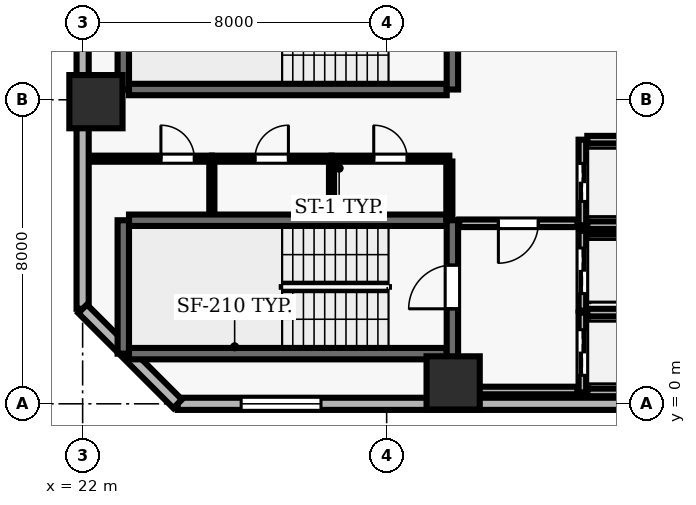
"""IFC4 building model, lengths in metres.
Left out: names, types, materials, properties, quantities, classifications, styles, units other than length and angle.
Written with IfcOpenShell. Run it as: python <this file> out.ifc"""

import sys

from ifc_helpers import new_model, si_unit, direction, frame, frame_2d, origin, origin_2d, place, context, subcontext, project, spatial, rectangle, extrude, element, fill, save


model = new_model("IFC4")
c1 = context("Model", 3, precision=1e-05, world=origin(), true_north=direction((0.0, 1.0)))
c2 = subcontext(c1, "Body", "Model", "MODEL_VIEW")
j1 = project(units=[si_unit("LENGTHUNIT", "METRE"), si_unit("PLANEANGLEUNIT", "RADIAN")], contexts=[c1])
p1 = place(None, origin())
s1 = spatial("IfcSite", under=j1, at=p1, CompositionType="ELEMENT")
p2 = place(p1, origin())
s2 = spatial("IfcBuilding", under=s1, at=p2, CompositionType="ELEMENT")
p3 = place(p2, frame((0.0, 0.0, 66.1)))
s3 = spatial("IfcBuildingStorey", under=s2, at=p3, CompositionType="ELEMENT", Elevation=66.1)
for number, where, z_axis, x_axis in (
    (1, (31.75, 0.55, 0.0), (0.0, 0.0, 1.0), (1.0, 0.0, 0.0)),
    (2, (22.35, 7.95, 0.0), (0.0, 0.0, 1.0), (1.0, 0.0, 0.0)),
):
    element("IfcColumn", number, at=place(p3, frame(where, z_axis=z_axis, x_axis=x_axis)), inside=s3, PredefinedType="COLUMN", context=c2, shape_type="SweptSolid", body=[
        extrude(rectangle(XDim=1.4, YDim=1.4, at=origin_2d()), origin(), (0.0, 0.0, 1.0), 3.9),
    ])
p4 = place(p3, frame((24.5, 0.0, 0.0), z_axis=(0.0, 0.0, 1.0), x_axis=(1.0, 0.0, 0.0)))
e3 = element("IfcWall", 3, at=p4, inside=s3, PredefinedType="SOLIDWALL", context=c2, shape_type="SweptSolid", body=[
    extrude(rectangle(XDim=49.0, YDim=0.32, at=frame_2d((24.5, 0.0))), origin(), (0.0, 0.0, 1.0), 3.69),
])
p5 = place(p4, frame((1.672, 0.0, 0.9)))
e4 = element("IfcOpeningElement", 4, at=p5, cuts=e3, PredefinedType="OPENING", context=c2, shape_type="SweptSolid", body=[
    extrude(rectangle(XDim=2.1, YDim=1.6, at=frame_2d((1.05, 0.8))), frame((0.0, 0.17, 0.0), z_axis=(0.0, -1.0, 0.0), x_axis=(1.0, 0.0, 0.0)), (0.0, 0.0, 1.0), 0.34),
])
p6 = place(p4, frame((18.006, 0.0, 0.9)))
e5 = element("IfcOpeningElement", 5, at=p6, cuts=e3, PredefinedType="OPENING", context=c2, shape_type="SweptSolid", body=[
    extrude(rectangle(XDim=2.1, YDim=1.6, at=frame_2d((1.05, 0.8))), frame((0.0, 0.17, 0.0), z_axis=(0.0, -1.0, 0.0), x_axis=(1.0, 0.0, 0.0)), (0.0, 0.0, 1.0), 0.34),
])
p7 = place(p4, frame((23.9, 0.0, 0.9)))
e6 = element("IfcOpeningElement", 6, at=p7, cuts=e3, PredefinedType="OPENING", context=c2, shape_type="SweptSolid", body=[
    extrude(rectangle(XDim=2.1, YDim=1.6, at=frame_2d((1.05, 0.8))), frame((0.0, 0.17, 0.0), z_axis=(0.0, -1.0, 0.0), x_axis=(1.0, 0.0, 0.0)), (0.0, 0.0, 1.0), 0.34),
])
p8 = place(p4, frame((34.339, 0.0, 0.9)))
e7 = element("IfcOpeningElement", 7, at=p8, cuts=e3, PredefinedType="OPENING", context=c2, shape_type="SweptSolid", body=[
    extrude(rectangle(XDim=2.1, YDim=1.6, at=frame_2d((1.05, 0.8))), frame((0.0, 0.17, 0.0), z_axis=(0.0, -1.0, 0.0), x_axis=(1.0, 0.0, 0.0)), (0.0, 0.0, 1.0), 0.34),
])
p9 = place(p4, frame((39.783, 0.0, 0.9)))
e8 = element("IfcOpeningElement", 8, at=p9, cuts=e3, PredefinedType="OPENING", context=c2, shape_type="SweptSolid", body=[
    extrude(rectangle(XDim=2.1, YDim=1.6, at=frame_2d((1.05, 0.8))), frame((0.0, 0.17, 0.0), z_axis=(0.0, -1.0, 0.0), x_axis=(1.0, 0.0, 0.0)), (0.0, 0.0, 1.0), 0.34),
])
p10 = place(p4, frame((45.678, 0.0, 0.9)))
e9 = element("IfcOpeningElement", 9, at=p10, cuts=e3, PredefinedType="OPENING", context=c2, shape_type="SweptSolid", body=[
    extrude(rectangle(XDim=2.1, YDim=1.6, at=frame_2d((1.05, 0.8))), frame((0.0, 0.17, 0.0), z_axis=(0.0, -1.0, 0.0), x_axis=(1.0, 0.0, 0.0)), (0.0, 0.0, 1.0), 0.34),
])
p11 = place(p3, frame((22.0, 51.5, 0.0), z_axis=(0.0, 0.0, 1.0), x_axis=(0.0, -1.0, 0.0)))
e10 = element("IfcWall", 10, at=p11, inside=s3, PredefinedType="SOLIDWALL", context=c2, shape_type="SweptSolid", body=[
    extrude(rectangle(XDim=49.0, YDim=0.32, at=frame_2d((24.5, 0.0))), origin(), (0.0, 0.0, 1.0), 3.69),
])
p12 = place(p11, frame((12.1, 0.0, 0.0)))
e11 = element("IfcOpeningElement", 11, at=p12, cuts=e10, PredefinedType="OPENING", context=c2, shape_type="SweptSolid", body=[
    extrude(rectangle(XDim=1.0, YDim=2.2, at=frame_2d((0.5, 1.1))), frame((0.0, 0.17, 0.0), z_axis=(0.0, -1.0, 0.0), x_axis=(1.0, 0.0, 0.0)), (0.0, 0.0, 1.0), 0.34),
])
p13 = place(p11, frame((1.672, 0.0, 0.9)))
e12 = element("IfcOpeningElement", 12, at=p13, cuts=e10, PredefinedType="OPENING", context=c2, shape_type="SweptSolid", body=[
    extrude(rectangle(XDim=2.1, YDim=1.6, at=frame_2d((1.05, 0.8))), frame((0.0, 0.17, 0.0), z_axis=(0.0, -1.0, 0.0), x_axis=(1.0, 0.0, 0.0)), (0.0, 0.0, 1.0), 0.34),
])
p14 = place(p11, frame((7.117, 0.0, 0.9)))
e13 = element("IfcOpeningElement", 13, at=p14, cuts=e10, PredefinedType="OPENING", context=c2, shape_type="SweptSolid", body=[
    extrude(rectangle(XDim=2.1, YDim=1.6, at=frame_2d((1.05, 0.8))), frame((0.0, 0.17, 0.0), z_axis=(0.0, -1.0, 0.0), x_axis=(1.0, 0.0, 0.0)), (0.0, 0.0, 1.0), 0.34),
])
p15 = place(p11, frame((18.006, 0.0, 0.9)))
e14 = element("IfcOpeningElement", 14, at=p15, cuts=e10, PredefinedType="OPENING", context=c2, shape_type="SweptSolid", body=[
    extrude(rectangle(XDim=2.1, YDim=1.6, at=frame_2d((1.05, 0.8))), frame((0.0, 0.17, 0.0), z_axis=(0.0, -1.0, 0.0), x_axis=(1.0, 0.0, 0.0)), (0.0, 0.0, 1.0), 0.34),
])
p16 = place(p11, frame((22.55, 0.0, 0.9)))
e15 = element("IfcOpeningElement", 15, at=p16, cuts=e10, PredefinedType="OPENING", context=c2, shape_type="SweptSolid", body=[
    extrude(rectangle(XDim=2.1, YDim=1.6, at=frame_2d((1.05, 0.8))), frame((0.0, 0.17, 0.0), z_axis=(0.0, -1.0, 0.0), x_axis=(1.0, 0.0, 0.0)), (0.0, 0.0, 1.0), 0.34),
])
p17 = place(p11, frame((29.344, 0.0, 0.9)))
e16 = element("IfcOpeningElement", 16, at=p17, cuts=e10, PredefinedType="OPENING", context=c2, shape_type="SweptSolid", body=[
    extrude(rectangle(XDim=2.1, YDim=1.6, at=frame_2d((1.05, 0.8))), frame((0.0, 0.17, 0.0), z_axis=(0.0, -1.0, 0.0), x_axis=(1.0, 0.0, 0.0)), (0.0, 0.0, 1.0), 0.34),
])
p18 = place(p11, frame((33.889, 0.0, 0.9)))
e17 = element("IfcOpeningElement", 17, at=p18, cuts=e10, PredefinedType="OPENING", context=c2, shape_type="SweptSolid", body=[
    extrude(rectangle(XDim=2.1, YDim=1.6, at=frame_2d((1.05, 0.8))), frame((0.0, 0.17, 0.0), z_axis=(0.0, -1.0, 0.0), x_axis=(1.0, 0.0, 0.0)), (0.0, 0.0, 1.0), 0.34),
])
p19 = place(p11, frame((39.783, 0.0, 0.9)))
e18 = element("IfcOpeningElement", 18, at=p19, cuts=e10, PredefinedType="OPENING", context=c2, shape_type="SweptSolid", body=[
    extrude(rectangle(XDim=2.1, YDim=1.6, at=frame_2d((1.05, 0.8))), frame((0.0, 0.17, 0.0), z_axis=(0.0, -1.0, 0.0), x_axis=(1.0, 0.0, 0.0)), (0.0, 0.0, 1.0), 0.34),
])
p20 = place(p3, frame((22.0, 2.5, 0.0), z_axis=(0.0, 0.0, 1.0), x_axis=(0.707106781187, -0.707106781187, 0.0)))
e19 = element("IfcWall", 19, at=p20, inside=s3, PredefinedType="SOLIDWALL", context=c2, shape_type="SweptSolid", body=[
    extrude(rectangle(XDim=3.536, YDim=0.32, at=frame_2d((1.768, 0.0))), origin(), (0.0, 0.0, 1.0), 3.69),
])
p21 = place(p3, frame((31.58, 4.83, 0.0), z_axis=(0.0, 0.0, 1.0), x_axis=(-1.0, 0.0, 0.0)))
e20 = element("IfcWall", 20, at=p21, inside=s3, PredefinedType="SHEAR", context=c2, shape_type="SweptSolid", body=[
    extrude(rectangle(XDim=8.36, YDim=0.3, at=frame_2d((4.18, 0.0))), origin(), (0.0, 0.0, 1.0), 3.69),
])
p22 = place(p3, frame((23.07, 4.83, 0.0), z_axis=(0.0, 0.0, 1.0), x_axis=(0.0, -1.0, 0.0)))
e21 = element("IfcWall", 21, at=p22, inside=s3, PredefinedType="SHEAR", context=c2, shape_type="SweptSolid", body=[
    extrude(rectangle(XDim=3.51, YDim=0.3, at=frame_2d((1.755, 0.0))), origin(), (0.0, 0.0, 1.0), 3.69),
])
p23 = place(p3, frame((23.22, 1.32, 0.0), z_axis=(0.0, 0.0, 1.0), x_axis=(1.0, 0.0, 0.0)))
e22 = element("IfcWall", 22, at=p23, inside=s3, PredefinedType="SHEAR", context=c2, shape_type="SweptSolid", body=[
    extrude(rectangle(XDim=8.36, YDim=0.3, at=frame_2d((4.18, 0.0))), origin(), (0.0, 0.0, 1.0), 3.69),
])
p24 = place(p3, frame((31.73, 0.96, 0.0), z_axis=(0.0, 0.0, 1.0), x_axis=(0.0, 1.0, 0.0)))
e23 = element("IfcWall", 23, at=p24, inside=s3, PredefinedType="SHEAR", context=c2, shape_type="SweptSolid", body=[
    extrude(rectangle(XDim=3.87, YDim=0.3, at=frame_2d((1.935, 0.0))), origin(), (0.0, 0.0, 1.0), 3.69),
])
p25 = place(p24, frame((1.54, 0.0, 0.0)))
e24 = element("IfcOpeningElement", 24, at=p25, cuts=e23, PredefinedType="OPENING", context=c2, shape_type="SweptSolid", body=[
    extrude(rectangle(XDim=1.15, YDim=2.15, at=frame_2d((0.575, 1.075))), frame((0.0, 0.16, 0.0), z_axis=(0.0, -1.0, 0.0), x_axis=(1.0, 0.0, 0.0)), (0.0, 0.0, 1.0), 0.32),
])
p26 = place(p3, frame((23.07, 11.78, 0.0), z_axis=(0.0, 0.0, 1.0), x_axis=(0.0, -1.0, 0.0)))
e25 = element("IfcWall", 25, at=p26, inside=s3, PredefinedType="SHEAR", context=c2, shape_type="SweptSolid", body=[
    extrude(rectangle(XDim=3.51, YDim=0.3, at=frame_2d((1.755, 0.0))), origin(), (0.0, 0.0, 1.0), 3.69),
])
p27 = place(p3, frame((23.22, 8.27, 0.0), z_axis=(0.0, 0.0, 1.0), x_axis=(1.0, 0.0, 0.0)))
e26 = element("IfcWall", 26, at=p27, inside=s3, PredefinedType="SHEAR", context=c2, shape_type="SweptSolid", body=[
    extrude(rectangle(XDim=8.36, YDim=0.3, at=frame_2d((4.18, 0.0))), origin(), (0.0, 0.0, 1.0), 3.69),
])
p28 = place(p3, frame((31.73, 8.27, 0.0), z_axis=(0.0, 0.0, 1.0), x_axis=(0.0, 1.0, 0.0)))
e27 = element("IfcWall", 27, at=p28, inside=s3, PredefinedType="SHEAR", context=c2, shape_type="SweptSolid", body=[
    extrude(rectangle(XDim=3.51, YDim=0.3, at=frame_2d((1.755, 0.0))), origin(), (0.0, 0.0, 1.0), 3.69),
])
p29 = place(p28, frame((1.18, 0.0, 0.0)))
e28 = element("IfcOpeningElement", 28, at=p29, cuts=e27, PredefinedType="OPENING", context=c2, shape_type="SweptSolid", body=[
    extrude(rectangle(XDim=1.15, YDim=2.15, at=frame_2d((0.575, 1.075))), frame((0.0, 0.16, 0.0), z_axis=(0.0, -1.0, 0.0), x_axis=(1.0, 0.0, 0.0)), (0.0, 0.0, 1.0), 0.32),
])
p30 = place(p3, frame((35.15, 2.4, 0.0), z_axis=(0.0, 0.0, 1.0), x_axis=(0.0, -1.0, 0.0)))
e29 = element("IfcWall", 29, at=p30, inside=s3, PredefinedType="SOLIDWALL", context=c2, shape_type="SweptSolid", body=[
    extrude(rectangle(XDim=2.1, YDim=0.2, at=frame_2d((1.05, 0.0))), origin(), (0.0, 0.0, 1.0), 3.69),
])
p31 = place(p30, frame((0.45, 0.0, 0.0)))
e30 = element("IfcOpeningElement", 30, at=p31, cuts=e29, PredefinedType="OPENING", context=c2, shape_type="SweptSolid", body=[
    extrude(rectangle(XDim=1.2, YDim=2.15, at=frame_2d((0.6, 1.075))), frame((0.0, 0.11, 0.0), z_axis=(0.0, -1.0, 0.0), x_axis=(1.0, 0.0, 0.0)), (0.0, 0.0, 1.0), 0.22),
])
for number, where, z_axis, x_axis in (
    (31, (35.28, 0.3, 0.0), (0.0, 0.0, 1.0), (1.0, 0.0, 0.0)),
    (32, (37.42, 2.4, 0.0), (0.0, 0.0, 1.0), (-1.0, 0.0, 0.0)),
):
    element("IfcWall", number, at=place(p3, frame(where, z_axis=z_axis, x_axis=x_axis)), inside=s3, PredefinedType="SOLIDWALL", context=c2, shape_type="SweptSolid", body=[
        extrude(rectangle(XDim=2.14, YDim=0.2, at=frame_2d((1.07, 0.0))), origin(), (0.0, 0.0, 1.0), 3.69),
    ])
p32 = place(p3, frame((35.15, 4.55, 0.0), z_axis=(0.0, 0.0, 1.0), x_axis=(0.0, -1.0, 0.0)))
e33 = element("IfcWall", 33, at=p32, inside=s3, PredefinedType="SOLIDWALL", context=c2, shape_type="SweptSolid", body=[
    extrude(rectangle(XDim=2.1, YDim=0.2, at=frame_2d((1.05, 0.0))), origin(), (0.0, 0.0, 1.0), 3.69),
])
p33 = place(p32, frame((0.45, 0.0, 0.0)))
e34 = element("IfcOpeningElement", 34, at=p33, cuts=e33, PredefinedType="OPENING", context=c2, shape_type="SweptSolid", body=[
    extrude(rectangle(XDim=1.2, YDim=2.15, at=frame_2d((0.6, 1.075))), frame((0.0, 0.11, 0.0), z_axis=(0.0, -1.0, 0.0), x_axis=(1.0, 0.0, 0.0)), (0.0, 0.0, 1.0), 0.22),
])
p34 = place(p3, frame((37.42, 4.55, 0.0), z_axis=(0.0, 0.0, 1.0), x_axis=(-1.0, 0.0, 0.0)))
e35 = element("IfcWall", 35, at=p34, inside=s3, PredefinedType="SOLIDWALL", context=c2, shape_type="SweptSolid", body=[
    extrude(rectangle(XDim=2.14, YDim=0.2, at=frame_2d((1.07, 0.0))), origin(), (0.0, 0.0, 1.0), 3.69),
])
p35 = place(p3, frame((35.15, 6.95, 0.0), z_axis=(0.0, 0.0, 1.0), x_axis=(0.0, -1.0, 0.0)))
e36 = element("IfcWall", 36, at=p35, inside=s3, PredefinedType="SOLIDWALL", context=c2, shape_type="SweptSolid", body=[
    extrude(rectangle(XDim=2.25, YDim=0.2, at=frame_2d((1.125, 0.0))), origin(), (0.0, 0.0, 1.0), 3.69),
])
p36 = place(p35, frame((0.625, 0.0, 0.0)))
e37 = element("IfcOpeningElement", 37, at=p36, cuts=e36, PredefinedType="OPENING", context=c2, shape_type="SweptSolid", body=[
    extrude(rectangle(XDim=1.0, YDim=2.1, at=frame_2d((0.5, 1.05))), frame((0.0, 0.11, 0.0), z_axis=(0.0, -1.0, 0.0), x_axis=(1.0, 0.0, 0.0)), (0.0, 0.0, 1.0), 0.22),
])
for number, where, z_axis, x_axis in (
    (38, (35.28, 4.7, 0.0), (0.0, 0.0, 1.0), (1.0, 0.0, 0.0)),
    (39, (37.42, 6.95, 0.0), (0.0, 0.0, 1.0), (-1.0, 0.0, 0.0)),
):
    element("IfcWall", number, at=place(p3, frame(where, z_axis=z_axis, x_axis=x_axis)), inside=s3, PredefinedType="SOLIDWALL", context=c2, shape_type="SweptSolid", body=[
        extrude(rectangle(XDim=2.14, YDim=0.2, at=frame_2d((1.07, 0.0))), origin(), (0.0, 0.0, 1.0), 3.69),
    ])
p37 = place(p3, frame((22.2, 6.45, 0.0), z_axis=(0.0, 0.0, 1.0), x_axis=(1.0, 0.0, 0.0)))
e40 = element("IfcWall", 40, at=p37, inside=s3, PredefinedType="PARTITIONING", context=c2, shape_type="SweptSolid", body=[
    extrude(rectangle(XDim=3.2, YDim=0.16, at=frame_2d((1.6, 0.0))), origin(), (0.0, 0.0, 1.0), 3.69),
])
p38 = place(p37, frame((1.86, 0.0, 0.0)))
e41 = element("IfcOpeningElement", 41, at=p38, cuts=e40, PredefinedType="OPENING", context=c2, shape_type="SweptSolid", body=[
    extrude(rectangle(XDim=0.88, YDim=2.1, at=frame_2d((0.44, 1.05))), frame((0.0, 0.09, 0.0), z_axis=(0.0, -1.0, 0.0), x_axis=(1.0, 0.0, 0.0)), (0.0, 0.0, 1.0), 0.18),
])
p39 = place(p3, frame((25.4, 6.45, 0.0), z_axis=(0.0, 0.0, 1.0), x_axis=(1.0, 0.0, 0.0)))
e42 = element("IfcWall", 42, at=p39, inside=s3, PredefinedType="PARTITIONING", context=c2, shape_type="SweptSolid", body=[
    extrude(rectangle(XDim=3.15, YDim=0.16, at=frame_2d((1.575, 0.0))), origin(), (0.0, 0.0, 1.0), 3.69),
])
p40 = place(p39, frame((1.135, 0.0, 0.0)))
e43 = element("IfcOpeningElement", 43, at=p40, cuts=e42, PredefinedType="OPENING", context=c2, shape_type="SweptSolid", body=[
    extrude(rectangle(XDim=0.88, YDim=2.1, at=frame_2d((0.44, 1.05))), frame((0.0, 0.09, 0.0), z_axis=(0.0, -1.0, 0.0), x_axis=(1.0, 0.0, 0.0)), (0.0, 0.0, 1.0), 0.18),
])
p41 = place(p3, frame((28.55, 6.45, 0.0), z_axis=(0.0, 0.0, 1.0), x_axis=(1.0, 0.0, 0.0)))
e44 = element("IfcWall", 44, at=p41, inside=s3, PredefinedType="PARTITIONING", context=c2, shape_type="SweptSolid", body=[
    extrude(rectangle(XDim=3.1, YDim=0.16, at=frame_2d((1.55, 0.0))), origin(), (0.0, 0.0, 1.0), 3.69),
])
p42 = place(p41, frame((1.11, 0.0, 0.0)))
e45 = element("IfcOpeningElement", 45, at=p42, cuts=e44, PredefinedType="OPENING", context=c2, shape_type="SweptSolid", body=[
    extrude(rectangle(XDim=0.88, YDim=2.1, at=frame_2d((0.44, 1.05))), frame((0.0, 0.09, 0.0), z_axis=(0.0, -1.0, 0.0), x_axis=(1.0, 0.0, 0.0)), (0.0, 0.0, 1.0), 0.18),
])
p43 = place(p3, frame((31.65, 0.35, 0.0), z_axis=(0.0, 0.0, 1.0), x_axis=(1.0, 0.0, 0.0)))
e46 = element("IfcWall", 46, at=p43, inside=s3, PredefinedType="SOLIDWALL", context=c2, shape_type="SweptSolid", body=[
    extrude(rectangle(XDim=3.37, YDim=0.2, at=frame_2d((1.685, 0.0))), origin(), (0.0, 0.0, 1.0), 3.69),
])
p44 = place(p3, frame((35.02, 4.75, 0.0), z_axis=(0.0, 0.0, 1.0), x_axis=(-1.0, 0.0, 0.0)))
e47 = element("IfcWall", 47, at=p44, inside=s3, PredefinedType="SOLIDWALL", context=c2, shape_type="SweptSolid", body=[
    extrude(rectangle(XDim=3.11, YDim=0.2, at=frame_2d((1.555, 0.0))), origin(), (0.0, 0.0, 1.0), 3.69),
])
p45 = place(p44, frame((1.03, 0.0, 0.0)))
e48 = element("IfcOpeningElement", 48, at=p45, cuts=e47, PredefinedType="OPENING", context=c2, shape_type="SweptSolid", body=[
    extrude(rectangle(XDim=1.05, YDim=2.15, at=frame_2d((0.525, 1.075))), frame((0.0, 0.11, 0.0), z_axis=(0.0, -1.0, 0.0), x_axis=(1.0, 0.0, 0.0)), (0.0, 0.0, 1.0), 0.22),
])
for number, where, z_axis, x_axis in (
    (49, (25.4, 5.01, 0.0), (0.0, 0.0, 1.0), (0.0, 1.0, 0.0)),
    (50, (28.55, 5.01, 0.0), (0.0, 0.0, 1.0), (0.0, 1.0, 0.0)),
):
    element("IfcWall", number, at=place(p3, frame(where, z_axis=z_axis, x_axis=x_axis)), inside=s3, PredefinedType="PARTITIONING", context=c2, shape_type="SweptSolid", body=[
        extrude(rectangle(XDim=1.365, YDim=0.135, at=frame_2d((0.683, 0.0))), origin(), (0.0, 0.0, 1.0), 3.69),
    ])
p46 = place(p3, frame((31.65, 4.86, 0.0), z_axis=(0.0, 0.0, 1.0), x_axis=(0.0, 1.0, 0.0)))
e51 = element("IfcWall", 51, at=p46, inside=s3, PredefinedType="PARTITIONING", context=c2, shape_type="SweptSolid", body=[
    extrude(rectangle(XDim=1.515, YDim=0.16, at=frame_2d((0.757, 0.0))), origin(), (0.0, 0.0, 1.0), 3.69),
])
p47 = place(p5, origin())
e52 = element("IfcWindow", 52, at=p47, inside=s3, PartitioningType="SINGLE_PANEL", PredefinedType="WINDOW", context=c2, shape_type="SweptSolid", body=[
    extrude(rectangle(XDim=2.1, YDim=1.6, at=frame_2d((1.05, 0.8))), frame((0.0, 0.03, 0.0), z_axis=(0.0, -1.0, 0.0), x_axis=(1.0, 0.0, 0.0)), (0.0, 0.0, 1.0), 0.06),
])
fill(e4, e52)
p48 = place(p25, origin())
e53 = element("IfcDoor", 53, at=p48, inside=s3, OperationType="SINGLE_SWING_LEFT", PredefinedType="DOOR", context=c2, shape_type="SweptSolid", body=[
    extrude(rectangle(XDim=1.15, YDim=2.15, at=frame_2d((0.575, 1.075))), frame((0.0, 0.025, 0.0), z_axis=(0.0, -1.0, 0.0), x_axis=(1.0, 0.0, 0.0)), (0.0, 0.0, 1.0), 0.05),
])
fill(e24, e53)
p49 = place(p31, origin())
e54 = element("IfcDoor", 54, at=p49, inside=s3, OperationType="DOUBLE_DOOR_SLIDING", PredefinedType="DOOR", context=c2, shape_type="SweptSolid", body=[
    extrude(rectangle(XDim=1.2, YDim=2.15, at=frame_2d((0.6, 1.075))), frame((0.0, 0.025, 0.0), z_axis=(0.0, -1.0, 0.0), x_axis=(1.0, 0.0, 0.0)), (0.0, 0.0, 1.0), 0.05),
])
fill(e30, e54)
p50 = place(p33, origin())
e55 = element("IfcDoor", 55, at=p50, inside=s3, OperationType="DOUBLE_DOOR_SLIDING", PredefinedType="DOOR", context=c2, shape_type="SweptSolid", body=[
    extrude(rectangle(XDim=1.2, YDim=2.15, at=frame_2d((0.6, 1.075))), frame((0.0, 0.025, 0.0), z_axis=(0.0, -1.0, 0.0), x_axis=(1.0, 0.0, 0.0)), (0.0, 0.0, 1.0), 0.05),
])
fill(e34, e55)
p51 = place(p36, origin())
e56 = element("IfcDoor", 56, at=p51, inside=s3, OperationType="DOUBLE_DOOR_SLIDING", PredefinedType="DOOR", context=c2, shape_type="SweptSolid", body=[
    extrude(rectangle(XDim=1.0, YDim=2.1, at=frame_2d((0.5, 1.05))), frame((0.0, 0.025, 0.0), z_axis=(0.0, -1.0, 0.0), x_axis=(1.0, 0.0, 0.0)), (0.0, 0.0, 1.0), 0.05),
])
fill(e37, e56)
p52 = place(p45, origin())
e57 = element("IfcDoor", 57, at=p52, inside=s3, OperationType="SINGLE_SWING_RIGHT", PredefinedType="DOOR", context=c2, shape_type="SweptSolid", body=[
    extrude(rectangle(XDim=1.05, YDim=2.15, at=frame_2d((0.525, 1.075))), frame((0.0, 0.025, 0.0), z_axis=(0.0, -1.0, 0.0), x_axis=(1.0, 0.0, 0.0)), (0.0, 0.0, 1.0), 0.05),
])
fill(e48, e57)
p53 = place(p38, origin())
e58 = element("IfcDoor", 58, at=p53, inside=s3, OperationType="SINGLE_SWING_LEFT", PredefinedType="DOOR", context=c2, shape_type="SweptSolid", body=[
    extrude(rectangle(XDim=0.88, YDim=2.1, at=frame_2d((0.44, 1.05))), frame((0.0, 0.025, 0.0), z_axis=(0.0, -1.0, 0.0), x_axis=(1.0, 0.0, 0.0)), (0.0, 0.0, 1.0), 0.05),
])
fill(e41, e58)
p54 = place(p40, origin())
e59 = element("IfcDoor", 59, at=p54, inside=s3, OperationType="SINGLE_SWING_RIGHT", PredefinedType="DOOR", context=c2, shape_type="SweptSolid", body=[
    extrude(rectangle(XDim=0.88, YDim=2.1, at=frame_2d((0.44, 1.05))), frame((0.0, 0.025, 0.0), z_axis=(0.0, -1.0, 0.0), x_axis=(1.0, 0.0, 0.0)), (0.0, 0.0, 1.0), 0.05),
])
fill(e43, e59)
p55 = place(p42, origin())
e60 = element("IfcDoor", 60, at=p55, inside=s3, OperationType="SINGLE_SWING_LEFT", PredefinedType="DOOR", context=c2, shape_type="SweptSolid", body=[
    extrude(rectangle(XDim=0.88, YDim=2.1, at=frame_2d((0.44, 1.05))), frame((0.0, 0.025, 0.0), z_axis=(0.0, -1.0, 0.0), x_axis=(1.0, 0.0, 0.0)), (0.0, 0.0, 1.0), 0.05),
])
fill(e45, e60)
save(model, sys.argv[1])
